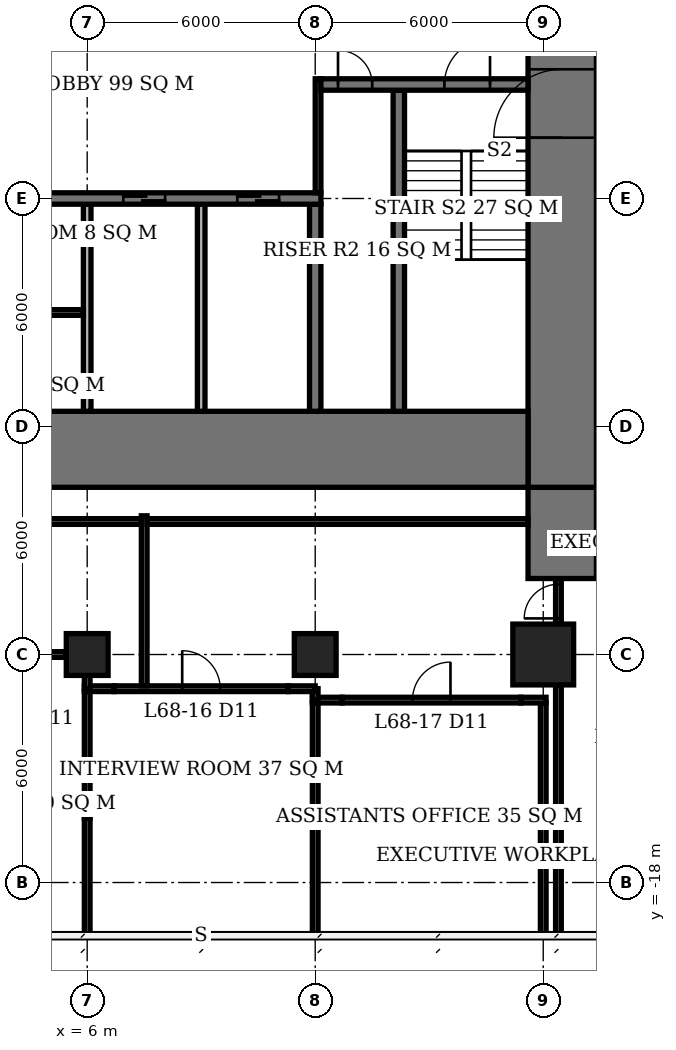
"""IFC4 building model, lengths in metres.
Left out: names, types, materials, properties, quantities, classifications, styles, units other than length and angle.
Written with IfcOpenShell. Run it as: python <this file> out.ifc"""

import sys

from ifc_helpers import new_model, si_unit, direction, frame, frame_2d, origin, origin_2d, place, context, subcontext, project, spatial, rectangle, extrude, element, fill, save


model = new_model("IFC4")
c1 = context("Model", 3, precision=1e-05, world=origin(), true_north=direction((0.0, 1.0)))
c2 = subcontext(c1, "Body", "Model", "MODEL_VIEW")
j1 = project(units=[si_unit("LENGTHUNIT", "METRE"), si_unit("PLANEANGLEUNIT", "RADIAN")], contexts=[c1])
p1 = place(None, origin())
s1 = spatial("IfcSite", under=j1, at=p1, CompositionType="ELEMENT")
p2 = place(p1, origin())
s2 = spatial("IfcBuilding", under=s1, at=p2, CompositionType="ELEMENT")
p3 = place(p2, frame((0.0, 0.0, 276.2)))
s3 = spatial("IfcBuildingStorey", under=s2, at=p3, CompositionType="ELEMENT", Elevation=276.2)
for number, where, z_axis, x_axis in (
    (1, (6.0, -12.0, 0.0), (0.0, 0.0, 1.0), (1.0, 0.0, 0.0)),
    (2, (12.0, -12.0, 0.0), (0.0, 0.0, 1.0), (1.0, 0.0, 0.0)),
):
    element("IfcColumn", number, at=place(p3, frame(where, z_axis=z_axis, x_axis=x_axis)), inside=s3, PredefinedType="COLUMN", context=c2, shape_type="SweptSolid", body=[
        extrude(rectangle(XDim=1.1, YDim=1.1, at=origin_2d()), origin(), (0.0, 0.0, 1.0), 3.9),
    ])
p4 = place(p3, frame((18.0, -12.0, 0.0), z_axis=(0.0, 0.0, 1.0), x_axis=(1.0, 0.0, 0.0)))
e3 = element("IfcColumn", 3, at=p4, inside=s3, PredefinedType="COLUMN", context=c2, shape_type="SweptSolid", body=[
    extrude(rectangle(XDim=1.6, YDim=1.6, at=origin_2d()), origin(), (0.0, 0.0, 1.0), 3.9),
])
p5 = place(p3, frame((-5.6, -6.6, 0.0), z_axis=(0.0, 0.0, 1.0), x_axis=(1.0, 0.0, 0.0)))
e4 = element("IfcWall", 4, at=p5, inside=s3, PredefinedType="SHEAR", context=c2, shape_type="SweptSolid", body=[
    extrude(rectangle(XDim=23.2, YDim=2.0, at=frame_2d((11.6, 0.0))), origin(), (0.0, 0.0, 1.0), 3.9),
])
p6 = place(p3, frame((18.5, -7.6, 0.0), z_axis=(0.0, 0.0, 1.0), x_axis=(0.0, 1.0, 0.0)))
e5 = element("IfcWall", 5, at=p6, inside=s3, PredefinedType="SHEAR", context=c2, shape_type="SweptSolid", body=[
    extrude(rectangle(XDim=21.2, YDim=1.8, at=frame_2d((10.6, 0.0))), origin(), (0.0, 0.0, 1.0), 3.9),
])
p7 = place(p6, frame((9.2, 0.0, 0.0)))
e6 = element("IfcOpeningElement", 6, at=p7, cuts=e5, PredefinedType="OPENING", context=c2, shape_type="SweptSolid", body=[
    extrude(rectangle(XDim=1.8, YDim=2.4, at=frame_2d((0.9, 1.2))), frame((0.0, 0.91, 0.0), z_axis=(0.0, -1.0, 0.0), x_axis=(1.0, 0.0, 0.0)), (0.0, 0.0, 1.0), 1.82),
])
p8 = place(p3, frame((18.5, -10.0, 0.0), z_axis=(0.0, 0.0, 1.0), x_axis=(0.0, 1.0, 0.0)))
e7 = element("IfcWall", 7, at=p8, inside=s3, PredefinedType="SHEAR", context=c2, shape_type="SweptSolid", body=[
    extrude(rectangle(XDim=2.4, YDim=1.8, at=frame_2d((1.2, 0.0))), origin(), (0.0, 0.0, 1.0), 3.9),
])
p9 = place(p3, frame((-5.6, 0.0, 0.0), z_axis=(0.0, 0.0, 1.0), x_axis=(1.0, 0.0, 0.0)))
e8 = element("IfcWall", 8, at=p9, inside=s3, PredefinedType="SHEAR", context=c2, shape_type="SweptSolid", body=[
    extrude(rectangle(XDim=17.75, YDim=0.3, at=frame_2d((8.875, 0.0))), origin(), (0.0, 0.0, 1.0), 3.9),
])
p10 = place(p9, frame((0.6, 0.0, 0.0)))
e9 = element("IfcOpeningElement", 9, at=p10, cuts=e8, PredefinedType="OPENING", context=c2, shape_type="SweptSolid", body=[
    extrude(rectangle(XDim=0.9, YDim=2.1, at=frame_2d((0.45, 1.05))), frame((0.0, 0.16, 0.0), z_axis=(0.0, -1.0, 0.0), x_axis=(1.0, 0.0, 0.0)), (0.0, 0.0, 1.0), 0.32),
])
p11 = place(p9, frame((3.7, 0.0, 0.0)))
e10 = element("IfcOpeningElement", 10, at=p11, cuts=e8, PredefinedType="OPENING", context=c2, shape_type="SweptSolid", body=[
    extrude(rectangle(XDim=1.0, YDim=2.1, at=frame_2d((0.5, 1.05))), frame((0.0, 0.16, 0.0), z_axis=(0.0, -1.0, 0.0), x_axis=(1.0, 0.0, 0.0)), (0.0, 0.0, 1.0), 0.32),
])
p12 = place(p9, frame((9.6, 0.0, 0.0)))
e11 = element("IfcOpeningElement", 11, at=p12, cuts=e8, PredefinedType="OPENING", context=c2, shape_type="SweptSolid", body=[
    extrude(rectangle(XDim=1.0, YDim=2.1, at=frame_2d((0.5, 1.05))), frame((0.0, 0.16, 0.0), z_axis=(0.0, -1.0, 0.0), x_axis=(1.0, 0.0, 0.0)), (0.0, 0.0, 1.0), 0.32),
])
p13 = place(p9, frame((12.55, 0.0, 0.0)))
e12 = element("IfcOpeningElement", 12, at=p13, cuts=e8, PredefinedType="OPENING", context=c2, shape_type="SweptSolid", body=[
    extrude(rectangle(XDim=1.1, YDim=2.1, at=frame_2d((0.55, 1.05))), frame((0.0, 0.16, 0.0), z_axis=(0.0, -1.0, 0.0), x_axis=(1.0, 0.0, 0.0)), (0.0, 0.0, 1.0), 0.32),
])
p14 = place(p9, frame((15.55, 0.0, 0.0)))
e13 = element("IfcOpeningElement", 13, at=p14, cuts=e8, PredefinedType="OPENING", context=c2, shape_type="SweptSolid", body=[
    extrude(rectangle(XDim=1.1, YDim=2.1, at=frame_2d((0.55, 1.05))), frame((0.0, 0.16, 0.0), z_axis=(0.0, -1.0, 0.0), x_axis=(1.0, 0.0, 0.0)), (0.0, 0.0, 1.0), 0.32),
])
p15 = place(p3, frame((12.15, 3.0, 0.0), z_axis=(0.0, 0.0, 1.0), x_axis=(1.0, 0.0, 0.0)))
e14 = element("IfcWall", 14, at=p15, inside=s3, PredefinedType="SHEAR", context=c2, shape_type="SweptSolid", body=[
    extrude(rectangle(XDim=5.45, YDim=0.3, at=frame_2d((2.725, 0.0))), origin(), (0.0, 0.0, 1.0), 3.9),
])
p16 = place(p15, frame((3.25, 0.0, 0.0)))
e15 = element("IfcOpeningElement", 15, at=p16, cuts=e14, PredefinedType="OPENING", context=c2, shape_type="SweptSolid", body=[
    extrude(rectangle(XDim=1.2, YDim=2.1, at=frame_2d((0.6, 1.05))), frame((0.0, 0.16, 0.0), z_axis=(0.0, -1.0, 0.0), x_axis=(1.0, 0.0, 0.0)), (0.0, 0.0, 1.0), 0.32),
])
p17 = place(p15, frame((0.45, 0.0, 0.0)))
e16 = element("IfcOpeningElement", 16, at=p17, cuts=e14, PredefinedType="OPENING", context=c2, shape_type="SweptSolid", body=[
    extrude(rectangle(XDim=0.9, YDim=2.1, at=frame_2d((0.45, 1.05))), frame((0.0, 0.16, 0.0), z_axis=(0.0, -1.0, 0.0), x_axis=(1.0, 0.0, 0.0)), (0.0, 0.0, 1.0), 0.32),
])
p18 = place(p3, frame((12.0, -5.6, 0.0), z_axis=(0.0, 0.0, 1.0), x_axis=(0.0, 1.0, 0.0)))
e17 = element("IfcWall", 17, at=p18, inside=s3, PredefinedType="SHEAR", context=c2, shape_type="SweptSolid", body=[
    extrude(rectangle(XDim=5.45, YDim=0.3, at=frame_2d((2.725, 0.0))), origin(), (0.0, 0.0, 1.0), 3.9),
])
p19 = place(p3, frame((14.2, -5.6, 0.0), z_axis=(0.0, 0.0, 1.0), x_axis=(0.0, 1.0, 0.0)))
e18 = element("IfcWall", 18, at=p19, inside=s3, PredefinedType="SHEAR", context=c2, shape_type="SweptSolid", body=[
    extrude(rectangle(XDim=8.45, YDim=0.3, at=frame_2d((4.225, 0.0))), origin(), (0.0, 0.0, 1.0), 3.9),
])
for number, where, z_axis, x_axis in (
    (19, (6.0, -5.6, 0.0), (0.0, 0.0, 1.0), (0.0, 1.0, 0.0)),
    (20, (9.0, -5.6, 0.0), (0.0, 0.0, 1.0), (0.0, 1.0, 0.0)),
):
    element("IfcWall", number, at=place(p3, frame(where, z_axis=z_axis, x_axis=x_axis)), inside=s3, PredefinedType="SOLIDWALL", context=c2, shape_type="SweptSolid", body=[
        extrude(rectangle(XDim=5.45, YDim=0.2, at=frame_2d((2.725, 0.0))), origin(), (0.0, 0.0, 1.0), 3.9),
    ])
p20 = place(p3, frame((3.1, -3.0, 0.0), z_axis=(0.0, 0.0, 1.0), x_axis=(1.0, 0.0, 0.0)))
e21 = element("IfcWall", 21, at=p20, inside=s3, PredefinedType="PARTITIONING", context=c2, shape_type="SweptSolid", body=[
    extrude(rectangle(XDim=2.8, YDim=0.15, at=frame_2d((1.4, 0.0))), origin(), (0.0, 0.0, 1.0), 3.65),
])
p21 = place(p20, frame((0.9, 0.0, 0.0)))
e22 = element("IfcOpeningElement", 22, at=p21, cuts=e21, PredefinedType="OPENING", context=c2, shape_type="SweptSolid", body=[
    extrude(rectangle(XDim=1.0, YDim=2.1, at=frame_2d((0.5, 1.05))), frame((0.0, 0.085, 0.0), z_axis=(0.0, -1.0, 0.0), x_axis=(1.0, 0.0, 0.0)), (0.0, 0.0, 1.0), 0.17),
])
p22 = place(p3, frame((11.925, -13.2, 0.0), z_axis=(0.0, 0.0, 1.0), x_axis=(1.0, 0.0, 0.0)))
e23 = element("IfcWall", 23, at=p22, inside=s3, PredefinedType="PARTITIONING", context=c2, shape_type="SweptSolid", body=[
    extrude(rectangle(XDim=0.785, YDim=0.15, at=frame_2d((0.393, 0.0))), origin(), (0.0, 0.0, 1.0), 2.65),
])
p23 = place(p3, frame((12.71, -13.2, 0.0), z_axis=(0.0, 0.0, 1.0), x_axis=(1.0, 0.0, 0.0)))
e24 = element("IfcWall", 24, at=p23, inside=s3, PredefinedType="PARTITIONING", context=c2, shape_type="SweptSolid", body=[
    extrude(rectangle(XDim=4.698, YDim=0.15, at=frame_2d((2.349, 0.0))), origin(), (0.0, 0.0, 1.0), 3.65),
])
p24 = place(p23, frame((1.849, 0.0, 0.0)))
e25 = element("IfcOpeningElement", 25, at=p24, cuts=e24, PredefinedType="OPENING", context=c2, shape_type="SweptSolid", body=[
    extrude(rectangle(XDim=1.0, YDim=2.4, at=frame_2d((0.5, 1.2))), frame((0.0, 0.085, 0.0), z_axis=(0.0, -1.0, 0.0), x_axis=(1.0, 0.0, 0.0)), (0.0, 0.0, 1.0), 0.17),
])
p25 = place(p3, frame((17.408, -13.2, 0.0), z_axis=(0.0, 0.0, 1.0), x_axis=(1.0, 0.0, 0.0)))
e26 = element("IfcWall", 26, at=p25, inside=s3, PredefinedType="PARTITIONING", context=c2, shape_type="SweptSolid", body=[
    extrude(rectangle(XDim=0.667, YDim=0.15, at=frame_2d((0.333, 0.0))), origin(), (0.0, 0.0, 1.0), 2.65),
])
p26 = place(p3, frame((5.925, -12.9, 0.0), z_axis=(0.0, 0.0, 1.0), x_axis=(1.0, 0.0, 0.0)))
e27 = element("IfcWall", 27, at=p26, inside=s3, PredefinedType="PARTITIONING", context=c2, shape_type="SweptSolid", body=[
    extrude(rectangle(XDim=0.785, YDim=0.15, at=frame_2d((0.393, 0.0))), origin(), (0.0, 0.0, 1.0), 2.65),
])
p27 = place(p3, frame((6.71, -12.9, 0.0), z_axis=(0.0, 0.0, 1.0), x_axis=(1.0, 0.0, 0.0)))
e28 = element("IfcWall", 28, at=p27, inside=s3, PredefinedType="PARTITIONING", context=c2, shape_type="SweptSolid", body=[
    extrude(rectangle(XDim=4.58, YDim=0.15, at=frame_2d((2.29, 0.0))), origin(), (0.0, 0.0, 1.0), 3.65),
])
p28 = place(p27, frame((1.79, 0.0, 0.0)))
e29 = element("IfcOpeningElement", 29, at=p28, cuts=e28, PredefinedType="OPENING", context=c2, shape_type="SweptSolid", body=[
    extrude(rectangle(XDim=1.0, YDim=2.4, at=frame_2d((0.5, 1.2))), frame((0.0, 0.085, 0.0), z_axis=(0.0, -1.0, 0.0), x_axis=(1.0, 0.0, 0.0)), (0.0, 0.0, 1.0), 0.17),
])
p29 = place(p3, frame((11.29, -12.9, 0.0), z_axis=(0.0, 0.0, 1.0), x_axis=(1.0, 0.0, 0.0)))
e30 = element("IfcWall", 30, at=p29, inside=s3, PredefinedType="PARTITIONING", context=c2, shape_type="SweptSolid", body=[
    extrude(rectangle(XDim=0.71, YDim=0.15, at=frame_2d((0.355, 0.0))), origin(), (0.0, 0.0, 1.0), 2.65),
])
p30 = place(p3, frame((3.075, -12.0, 0.0), z_axis=(0.0, 0.0, 1.0), x_axis=(1.0, 0.0, 0.0)))
e31 = element("IfcWall", 31, at=p30, inside=s3, PredefinedType="PARTITIONING", context=c2, shape_type="SweptSolid", body=[
    extrude(rectangle(XDim=2.365, YDim=0.15, at=frame_2d((1.183, 0.0))), origin(), (0.0, 0.0, 1.0), 3.65),
])
p31 = place(p30, frame((0.57, 0.0, 0.0)))
e32 = element("IfcOpeningElement", 32, at=p31, cuts=e31, PredefinedType="OPENING", context=c2, shape_type="SweptSolid", body=[
    extrude(rectangle(XDim=1.0, YDim=2.4, at=frame_2d((0.5, 1.2))), frame((0.0, 0.085, 0.0), z_axis=(0.0, -1.0, 0.0), x_axis=(1.0, 0.0, 0.0)), (0.0, 0.0, 1.0), 0.17),
])
p32 = place(p3, frame((6.0, -19.35, 0.0), z_axis=(0.0, 0.0, 1.0), x_axis=(0.0, 1.0, 0.0)))
e33 = element("IfcWall", 33, at=p32, inside=s3, PredefinedType="PARTITIONING", context=c2, shape_type="SweptSolid", body=[
    extrude(rectangle(XDim=3.04, YDim=0.15, at=frame_2d((1.52, 0.0))), origin(), (0.0, 0.0, 1.0), 3.65),
])
p33 = place(p3, frame((6.0, -16.31, 0.0), z_axis=(0.0, 0.0, 1.0), x_axis=(0.0, 1.0, 0.0)))
e34 = element("IfcWall", 34, at=p33, inside=s3, PredefinedType="PARTITIONING", context=c2, shape_type="SweptSolid", body=[
    extrude(rectangle(XDim=3.335, YDim=0.15, at=frame_2d((1.667, 0.0))), origin(), (0.0, 0.0, 1.0), 2.65),
])
p34 = place(p3, frame((6.0, -12.9, 0.0), z_axis=(0.0, 0.0, 1.0), x_axis=(0.0, 1.0, 0.0)))
e35 = element("IfcWall", 35, at=p34, inside=s3, PredefinedType="PARTITIONING", context=c2, shape_type="SweptSolid", body=[
    extrude(rectangle(XDim=0.35, YDim=0.15, at=frame_2d((0.175, 0.0))), origin(), (0.0, 0.0, 1.0), 2.65),
])
p35 = place(p3, frame((12.0, -19.35, 0.0), z_axis=(0.0, 0.0, 1.0), x_axis=(0.0, 1.0, 0.0)))
e36 = element("IfcWall", 36, at=p35, inside=s3, PredefinedType="PARTITIONING", context=c2, shape_type="SweptSolid", body=[
    extrude(rectangle(XDim=3.04, YDim=0.15, at=frame_2d((1.52, 0.0))), origin(), (0.0, 0.0, 1.0), 3.65),
])
p36 = place(p3, frame((12.0, -16.31, 0.0), z_axis=(0.0, 0.0, 1.0), x_axis=(0.0, 1.0, 0.0)))
e37 = element("IfcWall", 37, at=p36, inside=s3, PredefinedType="PARTITIONING", context=c2, shape_type="SweptSolid", body=[
    extrude(rectangle(XDim=3.035, YDim=0.15, at=frame_2d((1.518, 0.0))), origin(), (0.0, 0.0, 1.0), 2.65),
])
p37 = place(p3, frame((12.0, -13.2, 0.0), z_axis=(0.0, 0.0, 1.0), x_axis=(0.0, 1.0, 0.0)))
e38 = element("IfcWall", 38, at=p37, inside=s3, PredefinedType="PARTITIONING", context=c2, shape_type="SweptSolid", body=[
    extrude(rectangle(XDim=0.3, YDim=0.15, at=frame_2d((0.15, 0.0))), origin(), (0.0, 0.0, 1.0), 2.65),
])
p38 = place(p3, frame((18.0, -19.375, 0.0), z_axis=(0.0, 0.0, 1.0), x_axis=(0.0, 1.0, 0.0)))
e39 = element("IfcWall", 39, at=p38, inside=s3, PredefinedType="PARTITIONING", context=c2, shape_type="SweptSolid", body=[
    extrude(rectangle(XDim=3.065, YDim=0.15, at=frame_2d((1.532, 0.0))), origin(), (0.0, 0.0, 1.0), 3.65),
])
p39 = place(p3, frame((18.0, -16.31, 0.0), z_axis=(0.0, 0.0, 1.0), x_axis=(0.0, 1.0, 0.0)))
e40 = element("IfcWall", 40, at=p39, inside=s3, PredefinedType="PARTITIONING", context=c2, shape_type="SweptSolid", body=[
    extrude(rectangle(XDim=3.035, YDim=0.15, at=frame_2d((1.518, 0.0))), origin(), (0.0, 0.0, 1.0), 2.65),
])
p40 = place(p3, frame((7.425, -8.5, 0.0), z_axis=(0.0, 0.0, 1.0), x_axis=(-1.0, 0.0, 0.0)))
e41 = element("IfcWall", 41, at=p40, inside=s3, PredefinedType="PARTITIONING", context=c2, shape_type="SweptSolid", body=[
    extrude(rectangle(XDim=13.025, YDim=0.15, at=frame_2d((6.513, 0.0))), origin(), (0.0, 0.0, 1.0), 3.65),
])
p41 = place(p40, frame((7.94, 0.0, 0.0)))
e42 = element("IfcOpeningElement", 42, at=p41, cuts=e41, PredefinedType="OPENING", context=c2, shape_type="SweptSolid", body=[
    extrude(rectangle(XDim=1.0, YDim=2.4, at=frame_2d((0.5, 1.2))), frame((0.0, 0.085, 0.0), z_axis=(0.0, -1.0, 0.0), x_axis=(1.0, 0.0, 0.0)), (0.0, 0.0, 1.0), 0.17),
])
p42 = place(p3, frame((7.5, -12.825, 0.0), z_axis=(0.0, 0.0, 1.0), x_axis=(0.0, 1.0, 0.0)))
e43 = element("IfcWall", 43, at=p42, inside=s3, PredefinedType="PARTITIONING", context=c2, shape_type="SweptSolid", body=[
    extrude(rectangle(XDim=4.475, YDim=0.15, at=frame_2d((2.237, 0.0))), origin(), (0.0, 0.0, 1.0), 3.65),
])
p43 = place(p3, frame((7.575, -8.5, 0.0), z_axis=(0.0, 0.0, 1.0), x_axis=(1.0, 0.0, 0.0)))
e44 = element("IfcWall", 44, at=p43, inside=s3, PredefinedType="PARTITIONING", context=c2, shape_type="SweptSolid", body=[
    extrude(rectangle(XDim=10.025, YDim=0.15, at=frame_2d((5.013, 0.0))), origin(), (0.0, 0.0, 1.0), 3.65),
])
p44 = place(p3, frame((18.4, -19.35, 0.0), z_axis=(0.0, 0.0, 1.0), x_axis=(0.0, 1.0, 0.0)))
e45 = element("IfcWall", 45, at=p44, inside=s3, PredefinedType="PARTITIONING", context=c2, shape_type="SweptSolid", body=[
    extrude(rectangle(XDim=3.04, YDim=0.15, at=frame_2d((1.52, 0.0))), origin(), (0.0, 0.0, 1.0), 3.65),
])
p45 = place(p3, frame((18.4, -16.31, 0.0), z_axis=(0.0, 0.0, 1.0), x_axis=(0.0, 1.0, 0.0)))
e46 = element("IfcWall", 46, at=p45, inside=s3, PredefinedType="PARTITIONING", context=c2, shape_type="SweptSolid", body=[
    extrude(rectangle(XDim=3.51, YDim=0.15, at=frame_2d((1.755, 0.0))), origin(), (0.0, 0.0, 1.0), 2.65),
])
p46 = place(p3, frame((18.4, -11.2, 0.0), z_axis=(0.0, 0.0, 1.0), x_axis=(0.0, 1.0, 0.0)))
e47 = element("IfcWall", 47, at=p46, inside=s3, PredefinedType="PARTITIONING", context=c2, shape_type="SweptSolid", body=[
    extrude(rectangle(XDim=1.2, YDim=0.15, at=frame_2d((0.6, 0.0))), origin(), (0.0, 0.0, 1.0), 3.65),
])
p47 = place(p46, frame((0.15, 0.0, 0.0)))
e48 = element("IfcOpeningElement", 48, at=p47, cuts=e47, PredefinedType="OPENING", context=c2, shape_type="SweptSolid", body=[
    extrude(rectangle(XDim=0.9, YDim=2.1, at=frame_2d((0.45, 1.05))), frame((0.0, 0.085, 0.0), z_axis=(0.0, -1.0, 0.0), x_axis=(1.0, 0.0, 0.0)), (0.0, 0.0, 1.0), 0.17),
])
p48 = place(p3, frame((12.075, 0.15, 0.0), z_axis=(0.0, 0.0, 1.0), x_axis=(0.0, 1.0, 0.0)))
e49 = element("IfcWall", 49, at=p48, inside=s3, PredefinedType="PARTITIONING", context=c2, shape_type="SweptSolid", body=[
    extrude(rectangle(XDim=3.0, YDim=0.15, at=frame_2d((1.5, 0.0))), origin(), (0.0, 0.0, 1.0), 3.65),
])
p49 = place(p7, origin())
e50 = element("IfcDoor", 50, at=p49, inside=s3, OperationType="DOUBLE_DOOR_SINGLE_SWING", PredefinedType="DOOR", context=c2, shape_type="SweptSolid", body=[
    extrude(rectangle(XDim=1.8, YDim=2.4, at=frame_2d((0.9, 1.2))), frame((0.0, 0.025, 0.0), z_axis=(0.0, -1.0, 0.0), x_axis=(1.0, 0.0, 0.0)), (0.0, 0.0, 1.0), 0.05),
])
fill(e6, e50)
p50 = place(p16, origin())
e51 = element("IfcDoor", 51, at=p50, inside=s3, OperationType="SINGLE_SWING_RIGHT", PredefinedType="DOOR", context=c2, shape_type="SweptSolid", body=[
    extrude(rectangle(XDim=1.2, YDim=2.1, at=frame_2d((0.6, 1.05))), frame((0.0, 0.025, 0.0), z_axis=(0.0, -1.0, 0.0), x_axis=(1.0, 0.0, 0.0)), (0.0, 0.0, 1.0), 0.05),
])
fill(e15, e51)
p51 = place(p17, origin())
e52 = element("IfcDoor", 52, at=p51, inside=s3, OperationType="SINGLE_SWING_LEFT", PredefinedType="DOOR", context=c2, shape_type="SweptSolid", body=[
    extrude(rectangle(XDim=0.9, YDim=2.1, at=frame_2d((0.45, 1.05))), frame((0.0, 0.025, 0.0), z_axis=(0.0, -1.0, 0.0), x_axis=(1.0, 0.0, 0.0)), (0.0, 0.0, 1.0), 0.05),
])
fill(e16, e52)
p52 = place(p13, origin())
e53 = element("IfcDoor", 53, at=p52, inside=s3, OperationType="DOUBLE_DOOR_SLIDING", PredefinedType="USERDEFINED", context=c2, shape_type="SweptSolid", body=[
    extrude(rectangle(XDim=1.1, YDim=2.1, at=frame_2d((0.55, 1.05))), frame((0.0, 0.025, 0.0), z_axis=(0.0, -1.0, 0.0), x_axis=(1.0, 0.0, 0.0)), (0.0, 0.0, 1.0), 0.05),
])
fill(e12, e53)
p53 = place(p14, origin())
e54 = element("IfcDoor", 54, at=p53, inside=s3, OperationType="DOUBLE_DOOR_SLIDING", PredefinedType="USERDEFINED", context=c2, shape_type="SweptSolid", body=[
    extrude(rectangle(XDim=1.1, YDim=2.1, at=frame_2d((0.55, 1.05))), frame((0.0, 0.025, 0.0), z_axis=(0.0, -1.0, 0.0), x_axis=(1.0, 0.0, 0.0)), (0.0, 0.0, 1.0), 0.05),
])
fill(e13, e54)
p54 = place(p28, origin())
e55 = element("IfcDoor", 55, at=p54, inside=s3, OperationType="SINGLE_SWING_LEFT", PredefinedType="DOOR", context=c2, shape_type="SweptSolid", body=[
    extrude(rectangle(XDim=1.0, YDim=2.4, at=frame_2d((0.5, 1.2))), frame((0.0, 0.025, 0.0), z_axis=(0.0, -1.0, 0.0), x_axis=(1.0, 0.0, 0.0)), (0.0, 0.0, 1.0), 0.05),
])
fill(e29, e55)
p55 = place(p24, origin())
e56 = element("IfcDoor", 56, at=p55, inside=s3, OperationType="SINGLE_SWING_RIGHT", PredefinedType="DOOR", context=c2, shape_type="SweptSolid", body=[
    extrude(rectangle(XDim=1.0, YDim=2.4, at=frame_2d((0.5, 1.2))), frame((0.0, 0.025, 0.0), z_axis=(0.0, -1.0, 0.0), x_axis=(1.0, 0.0, 0.0)), (0.0, 0.0, 1.0), 0.05),
])
fill(e25, e56)
p56 = place(p47, origin())
e57 = element("IfcDoor", 57, at=p56, inside=s3, OperationType="SINGLE_SWING_LEFT", PredefinedType="DOOR", context=c2, shape_type="SweptSolid", body=[
    extrude(rectangle(XDim=0.9, YDim=2.1, at=frame_2d((0.45, 1.05))), frame((0.0, 0.025, 0.0), z_axis=(0.0, -1.0, 0.0), x_axis=(1.0, 0.0, 0.0)), (0.0, 0.0, 1.0), 0.05),
])
fill(e48, e57)
save(model, sys.argv[1])
